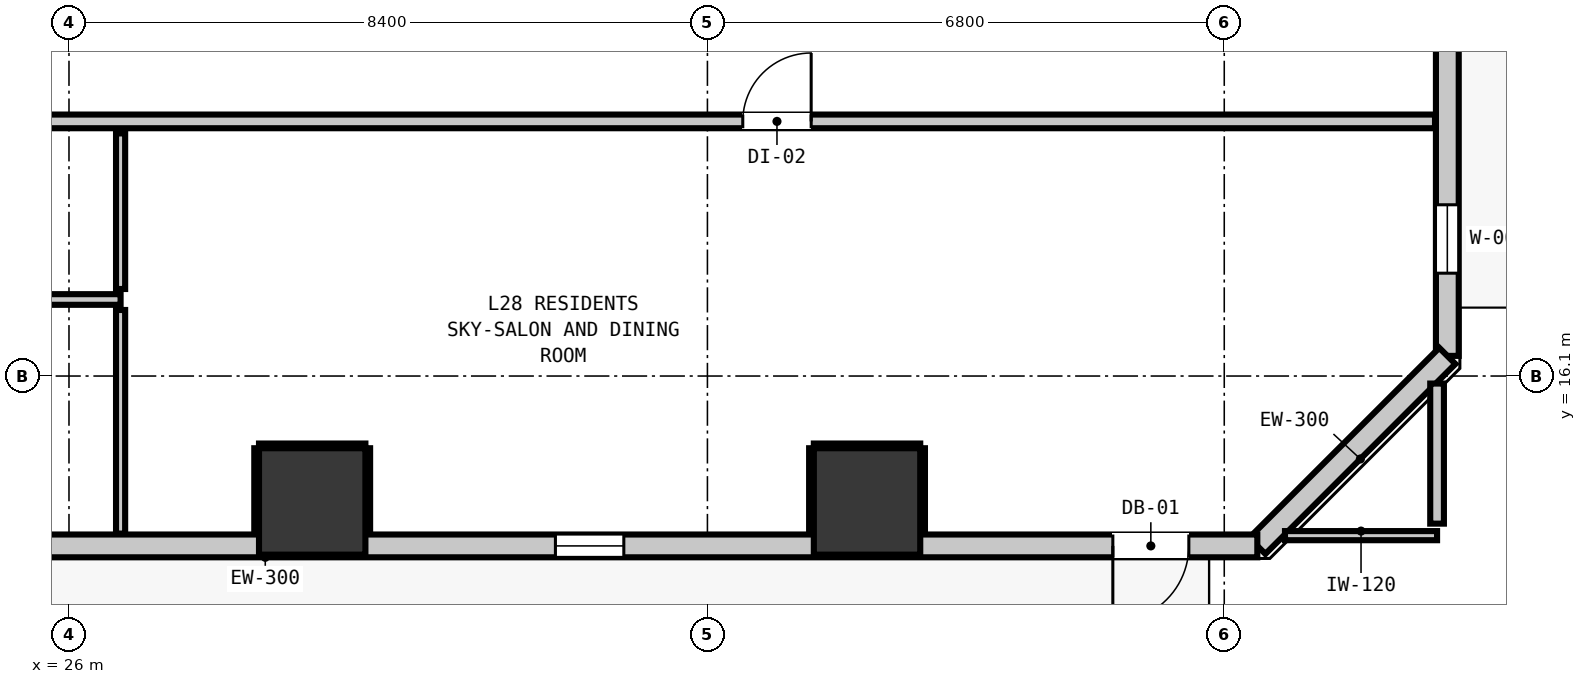
"""IFC4 building model, lengths in metres.
Left out: names, types, materials, properties, quantities, classifications, styles, units other than length and angle.
Written with IfcOpenShell. Run it as: python <this file> out.ifc"""

import sys

from ifc_helpers import new_model, si_unit, direction, frame, frame_2d, origin, origin_2d, place, context, subcontext, project, spatial, rectangle, extrude, element, fill, save


model = new_model("IFC4")
c1 = context("Model", 3, precision=1e-05, world=origin(), true_north=direction((0.0, 1.0)))
c2 = subcontext(c1, "Body", "Model", "MODEL_VIEW")
j1 = project(units=[si_unit("LENGTHUNIT", "METRE"), si_unit("PLANEANGLEUNIT", "RADIAN")], contexts=[c1])
p1 = place(None, origin())
s1 = spatial("IfcSite", under=j1, at=p1, CompositionType="ELEMENT")
p2 = place(p1, origin())
s2 = spatial("IfcBuilding", under=s1, at=p2, CompositionType="ELEMENT")
p3 = place(p2, frame((0.0, 0.0, 99.44)))
s3 = spatial("IfcBuildingStorey", under=s2, at=p3, CompositionType="ELEMENT", Elevation=99.44)
for number, where, z_axis, x_axis in (
    (1, (29.2, 14.45, 0.0), (0.0, 0.0, 1.0), (1.0, 0.0, 0.0)),
    (2, (36.5, 14.45, 0.0), (0.0, 0.0, 1.0), (1.0, 0.0, 0.0)),
):
    element("IfcColumn", number, at=place(p3, frame(where, z_axis=z_axis, x_axis=x_axis)), inside=s3, PredefinedType="COLUMN", context=c2, shape_type="SweptSolid", body=[
        extrude(rectangle(XDim=1.4, YDim=1.4, at=origin_2d()), origin(), (0.0, 0.0, 1.0), 3.32),
    ])
p4 = place(p3, frame((44.135, 51.035, 0.0), z_axis=(0.0, 0.0, 1.0), x_axis=(0.0, -1.0, 0.0)))
e3 = element("IfcWall", 3, at=p4, inside=s3, PredefinedType="STANDARD", context=c2, shape_type="SweptSolid", body=[
    extrude(rectangle(XDim=34.67, YDim=0.3, at=frame_2d((17.335, 0.0))), origin(), (0.0, 0.0, 1.0), 3.06),
])
p5 = place(p4, frame((0.901, 0.0, 0.0)))
e4 = element("IfcOpeningElement", 4, at=p5, cuts=e3, PredefinedType="OPENING", context=c2, shape_type="SweptSolid", body=[
    extrude(rectangle(XDim=1.0, YDim=2.15, at=frame_2d((0.5, 1.075))), frame((0.0, 0.16, 0.0), z_axis=(0.0, -1.0, 0.0), x_axis=(1.0, 0.0, 0.0)), (0.0, 0.0, 1.0), 0.32),
])
p6 = place(p4, frame((32.682, 0.0, 0.85)))
e5 = element("IfcOpeningElement", 5, at=p6, cuts=e3, PredefinedType="OPENING", context=c2, shape_type="SweptSolid", body=[
    extrude(rectangle(XDim=0.9, YDim=1.5, at=frame_2d((0.45, 0.75))), frame((0.0, 0.16, 0.0), z_axis=(0.0, -1.0, 0.0), x_axis=(1.0, 0.0, 0.0)), (0.0, 0.0, 1.0), 0.32),
])
p7 = place(p4, frame((23.323, 0.0, 0.85)))
e6 = element("IfcOpeningElement", 6, at=p7, cuts=e3, PredefinedType="OPENING", context=c2, shape_type="SweptSolid", body=[
    extrude(rectangle(XDim=0.9, YDim=1.5, at=frame_2d((0.45, 0.75))), frame((0.0, 0.16, 0.0), z_axis=(0.0, -1.0, 0.0), x_axis=(1.0, 0.0, 0.0)), (0.0, 0.0, 1.0), 0.32),
])
p8 = place(p3, frame((44.135, 16.365, 0.0), z_axis=(0.0, 0.0, 1.0), x_axis=(-0.707106781187, -0.707106781187, 0.0)))
e7 = element("IfcWall", 7, at=p8, inside=s3, PredefinedType="STANDARD", context=c2, shape_type="SweptSolid", body=[
    extrude(rectangle(XDim=3.536, YDim=0.3, at=frame_2d((1.768, 0.0))), origin(), (0.0, 0.0, 1.0), 3.06),
])
p9 = place(p3, frame((41.635, 13.865, 0.0), z_axis=(0.0, 0.0, 1.0), x_axis=(-1.0, 0.0, 0.0)))
e8 = element("IfcWall", 8, at=p9, inside=s3, PredefinedType="STANDARD", context=c2, shape_type="SweptSolid", body=[
    extrude(rectangle(XDim=37.47, YDim=0.3, at=frame_2d((18.735, 0.0))), origin(), (0.0, 0.0, 1.0), 3.06),
])
p10 = place(p9, frame((0.901, 0.0, 0.0)))
e9 = element("IfcOpeningElement", 9, at=p10, cuts=e8, PredefinedType="OPENING", context=c2, shape_type="SweptSolid", body=[
    extrude(rectangle(XDim=1.0, YDim=2.15, at=frame_2d((0.5, 1.075))), frame((0.0, 0.16, 0.0), z_axis=(0.0, -1.0, 0.0), x_axis=(1.0, 0.0, 0.0)), (0.0, 0.0, 1.0), 0.32),
])
p11 = place(p9, frame((31.024, 0.0, 0.85)))
e10 = element("IfcOpeningElement", 10, at=p11, cuts=e8, PredefinedType="OPENING", context=c2, shape_type="SweptSolid", body=[
    extrude(rectangle(XDim=0.9, YDim=1.5, at=frame_2d((0.45, 0.75))), frame((0.0, 0.16, 0.0), z_axis=(0.0, -1.0, 0.0), x_axis=(1.0, 0.0, 0.0)), (0.0, 0.0, 1.0), 0.32),
])
p12 = place(p9, frame((35.346, 0.0, 0.85)))
e11 = element("IfcOpeningElement", 11, at=p12, cuts=e8, PredefinedType="OPENING", context=c2, shape_type="SweptSolid", body=[
    extrude(rectangle(XDim=0.9, YDim=1.5, at=frame_2d((0.45, 0.75))), frame((0.0, 0.16, 0.0), z_axis=(0.0, -1.0, 0.0), x_axis=(1.0, 0.0, 0.0)), (0.0, 0.0, 1.0), 0.32),
])
p13 = place(p9, frame((23.592, 0.0, 0.85)))
e12 = element("IfcOpeningElement", 12, at=p13, cuts=e8, PredefinedType="OPENING", context=c2, shape_type="SweptSolid", body=[
    extrude(rectangle(XDim=0.9, YDim=1.5, at=frame_2d((0.45, 0.75))), frame((0.0, 0.16, 0.0), z_axis=(0.0, -1.0, 0.0), x_axis=(1.0, 0.0, 0.0)), (0.0, 0.0, 1.0), 0.32),
])
p14 = place(p9, frame((16.87, 0.0, 0.85)))
e13 = element("IfcOpeningElement", 13, at=p14, cuts=e8, PredefinedType="OPENING", context=c2, shape_type="SweptSolid", body=[
    extrude(rectangle(XDim=0.9, YDim=1.5, at=frame_2d((0.45, 0.75))), frame((0.0, 0.16, 0.0), z_axis=(0.0, -1.0, 0.0), x_axis=(1.0, 0.0, 0.0)), (0.0, 0.0, 1.0), 0.32),
])
p15 = place(p9, frame((8.335, 0.0, 0.85)))
e14 = element("IfcOpeningElement", 14, at=p15, cuts=e8, PredefinedType="OPENING", context=c2, shape_type="SweptSolid", body=[
    extrude(rectangle(XDim=0.9, YDim=1.5, at=frame_2d((0.45, 0.75))), frame((0.0, 0.16, 0.0), z_axis=(0.0, -1.0, 0.0), x_axis=(1.0, 0.0, 0.0)), (0.0, 0.0, 1.0), 0.32),
])
p16 = place(p3, frame((12.993, 19.45, 0.0), z_axis=(0.0, 0.0, 1.0), x_axis=(1.0, 0.0, 0.0)))
e15 = element("IfcWall", 15, at=p16, inside=s3, PredefinedType="PARTITIONING", context=c2, shape_type="SweptSolid", body=[
    extrude(rectangle(XDim=30.98, YDim=0.18, at=frame_2d((15.49, 0.0))), origin(), (0.0, 0.0, 1.0), 3.06),
])
p17 = place(p16, frame((21.872, 0.0, 0.0)))
e16 = element("IfcOpeningElement", 16, at=p17, cuts=e15, PredefinedType="OPENING", context=c2, shape_type="SweptSolid", body=[
    extrude(rectangle(XDim=0.9, YDim=2.1, at=frame_2d((0.45, 1.05))), frame((0.0, 0.1, 0.0), z_axis=(0.0, -1.0, 0.0), x_axis=(1.0, 0.0, 0.0)), (0.0, 0.0, 1.0), 0.2),
])
p18 = place(p3, frame((14.986, 17.107, 0.0), z_axis=(0.0, 0.0, 1.0), x_axis=(1.0, 0.0, 0.0)))
e17 = element("IfcWall", 17, at=p18, inside=s3, PredefinedType="PARTITIONING", context=c2, shape_type="SweptSolid", body=[
    extrude(rectangle(XDim=11.693, YDim=0.14, at=frame_2d((5.846, 0.0))), origin(), (0.0, 0.0, 1.0), 3.06),
])
p19 = place(p3, frame((41.999, 14.0, 0.0), z_axis=(0.0, 0.0, 1.0), x_axis=(1.0, 0.0, 0.0)))
e18 = element("IfcWall", 18, at=p19, inside=s3, PredefinedType="PARTITIONING", context=c2, shape_type="SweptSolid", body=[
    extrude(rectangle(XDim=2.001, YDim=0.12, at=frame_2d((1.0, 0.0))), origin(), (0.0, 0.0, 1.0), 3.06),
])
p20 = place(p3, frame((44.0, 14.158, 0.0), z_axis=(0.0, 0.0, 1.0), x_axis=(0.0, 1.0, 0.0)))
e19 = element("IfcWall", 19, at=p20, inside=s3, PredefinedType="PARTITIONING", context=c2, shape_type="SweptSolid", body=[
    extrude(rectangle(XDim=1.843, YDim=0.18, at=frame_2d((0.921, 0.0))), origin(), (0.0, 0.0, 1.0), 3.06),
])
p21 = place(p3, frame((26.679, 14.027, 0.0), z_axis=(0.0, 0.0, 1.0), x_axis=(0.0, 1.0, 0.0)))
e20 = element("IfcWall", 20, at=p21, inside=s3, PredefinedType="PARTITIONING", context=c2, shape_type="SweptSolid", body=[
    extrude(rectangle(XDim=2.942, YDim=0.12, at=frame_2d((1.471, 0.0))), origin(), (0.0, 0.0, 1.0), 3.06),
])
p22 = place(p3, frame((26.679, 17.245, 0.0), z_axis=(0.0, 0.0, 1.0), x_axis=(0.0, 1.0, 0.0)))
e21 = element("IfcWall", 21, at=p22, inside=s3, PredefinedType="PARTITIONING", context=c2, shape_type="SweptSolid", body=[
    extrude(rectangle(XDim=2.047, YDim=0.12, at=frame_2d((1.023, 0.0))), origin(), (0.0, 0.0, 1.0), 3.06),
])
p23 = place(p3, frame((28.5, 15.182, 0.0), z_axis=(0.0, 0.0, 1.0), x_axis=(1.0, 0.0, 0.0)))
e22 = element("IfcWall", 22, at=p23, inside=s3, PredefinedType="PARTITIONING", context=c2, shape_type="SweptSolid", body=[
    extrude(rectangle(XDim=1.4, YDim=0.06, at=frame_2d((0.7, 0.0))), origin(), (0.0, 0.0, 1.0), 1.45),
])
for number, where, z_axis, x_axis in (
    (23, (28.468, 14.03, 0.0), (0.0, 0.0, 1.0), (0.0, 1.0, 0.0)),
    (24, (29.932, 14.03, 0.0), (0.0, 0.0, 1.0), (0.0, 1.0, 0.0)),
):
    element("IfcWall", number, at=place(p3, frame(where, z_axis=z_axis, x_axis=x_axis)), inside=s3, PredefinedType="PARTITIONING", context=c2, shape_type="SweptSolid", body=[
        extrude(rectangle(XDim=1.12, YDim=0.06, at=frame_2d((0.56, 0.0))), origin(), (0.0, 0.0, 1.0), 1.45),
    ])
p24 = place(p3, frame((35.8, 15.182, 0.0), z_axis=(0.0, 0.0, 1.0), x_axis=(1.0, 0.0, 0.0)))
e25 = element("IfcWall", 25, at=p24, inside=s3, PredefinedType="PARTITIONING", context=c2, shape_type="SweptSolid", body=[
    extrude(rectangle(XDim=1.4, YDim=0.06, at=frame_2d((0.7, 0.0))), origin(), (0.0, 0.0, 1.0), 1.45),
])
for number, where, z_axis, x_axis in (
    (26, (35.768, 14.03, 0.0), (0.0, 0.0, 1.0), (0.0, 1.0, 0.0)),
    (27, (37.232, 14.03, 0.0), (0.0, 0.0, 1.0), (0.0, 1.0, 0.0)),
):
    element("IfcWall", number, at=place(p3, frame(where, z_axis=z_axis, x_axis=x_axis)), inside=s3, PredefinedType="PARTITIONING", context=c2, shape_type="SweptSolid", body=[
        extrude(rectangle(XDim=1.12, YDim=0.06, at=frame_2d((0.56, 0.0))), origin(), (0.0, 0.0, 1.0), 1.45),
    ])
p25 = place(p10, origin())
e28 = element("IfcDoor", 28, at=p25, inside=s3, OperationType="SINGLE_SWING_RIGHT", PredefinedType="DOOR", context=c2, shape_type="SweptSolid", body=[
    extrude(rectangle(XDim=1.0, YDim=2.15, at=frame_2d((0.5, 1.075))), frame((0.0, 0.025, 0.0), z_axis=(0.0, -1.0, 0.0), x_axis=(1.0, 0.0, 0.0)), (0.0, 0.0, 1.0), 0.05),
])
fill(e9, e28)
p26 = place(p6, origin())
e29 = element("IfcWindow", 29, at=p26, inside=s3, PartitioningType="SINGLE_PANEL", PredefinedType="WINDOW", context=c2, shape_type="SweptSolid", body=[
    extrude(rectangle(XDim=0.9, YDim=1.5, at=frame_2d((0.45, 0.75))), frame((0.0, 0.03, 0.0), z_axis=(0.0, -1.0, 0.0), x_axis=(1.0, 0.0, 0.0)), (0.0, 0.0, 1.0), 0.06),
])
fill(e5, e29)
p27 = place(p15, origin())
e30 = element("IfcWindow", 30, at=p27, inside=s3, PartitioningType="SINGLE_PANEL", PredefinedType="WINDOW", context=c2, shape_type="SweptSolid", body=[
    extrude(rectangle(XDim=0.9, YDim=1.5, at=frame_2d((0.45, 0.75))), frame((0.0, 0.03, 0.0), z_axis=(0.0, -1.0, 0.0), x_axis=(1.0, 0.0, 0.0)), (0.0, 0.0, 1.0), 0.06),
])
fill(e14, e30)
p28 = place(p17, origin())
e31 = element("IfcDoor", 31, at=p28, inside=s3, OperationType="SINGLE_SWING_RIGHT", PredefinedType="DOOR", context=c2, shape_type="SweptSolid", body=[
    extrude(rectangle(XDim=0.9, YDim=2.1, at=frame_2d((0.45, 1.05))), frame((0.0, 0.025, 0.0), z_axis=(0.0, -1.0, 0.0), x_axis=(1.0, 0.0, 0.0)), (0.0, 0.0, 1.0), 0.05),
])
fill(e16, e31)
save(model, sys.argv[1])
